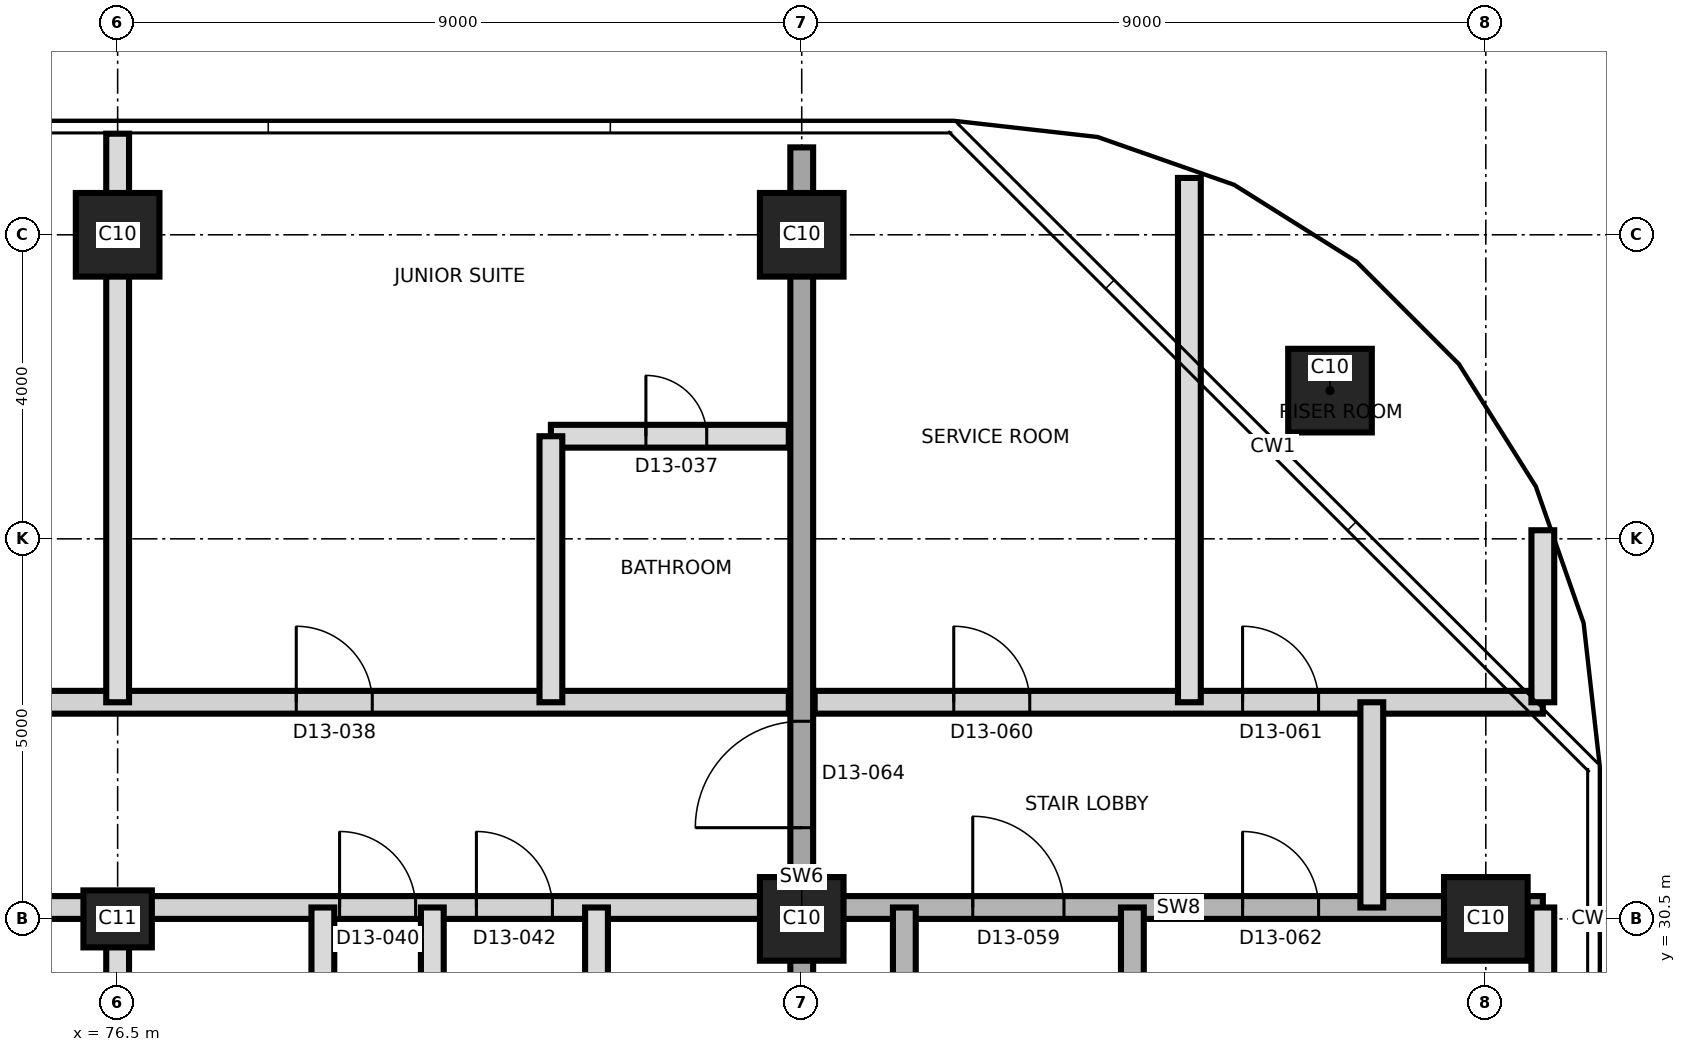
"""IFC4 building model, lengths in metres.
Left out: names, types, materials, properties, quantities, classifications, styles, units other than length and angle.
Written with IfcOpenShell. Run it as: python <this file> out.ifc"""

import sys

from ifc_helpers import new_model, si_unit, direction, frame, frame_2d, origin, origin_2d, place, context, subcontext, project, spatial, rectangle, extrude, element, fill, save


model = new_model("IFC4")
c1 = context("Model", 3, precision=1e-05, world=origin(), true_north=direction((0.0, 1.0)))
c2 = subcontext(c1, "Body", "Model", "MODEL_VIEW")
j1 = project(units=[si_unit("LENGTHUNIT", "METRE"), si_unit("PLANEANGLEUNIT", "RADIAN")], contexts=[c1])
p1 = place(None, origin())
s1 = spatial("IfcSite", under=j1, at=p1, CompositionType="ELEMENT")
p2 = place(p1, origin())
s2 = spatial("IfcBuilding", under=s1, at=p2, CompositionType="ELEMENT")
p3 = place(p2, frame((0.0, 0.0, 142.2)))
s3 = spatial("IfcBuildingStorey", under=s2, at=p3, CompositionType="ELEMENT", Elevation=142.2)
p4 = place(p3, frame((76.5, 30.5, 0.0), z_axis=(0.0, 0.0, 1.0), x_axis=(1.0, 0.0, 0.0)))
e1 = element("IfcColumn", 1, at=p4, inside=s3, PredefinedType="COLUMN", context=c2, shape_type="SweptSolid", body=[
    extrude(rectangle(XDim=0.9, YDim=0.75, at=origin_2d()), origin(), (0.0, 0.0, 1.0), 3.7),
])
for number, where, z_axis, x_axis in (
    (2, (85.5, 30.5, 0.0), (0.0, 0.0, 1.0), (1.0, 0.0, 0.0)),
    (3, (94.5, 30.5, 0.0), (0.0, 0.0, 1.0), (1.0, 0.0, 0.0)),
    (4, (92.45, 37.45, 0.0), (0.0, 0.0, 1.0), (1.0, 0.0, 0.0)),
    (5, (76.5, 39.5, 0.0), (0.0, 0.0, 1.0), (1.0, 0.0, 0.0)),
    (6, (85.5, 39.5, 0.0), (0.0, 0.0, 1.0), (1.0, 0.0, 0.0)),
):
    element("IfcColumn", number, at=place(p3, frame(where, z_axis=z_axis, x_axis=x_axis)), inside=s3, PredefinedType="COLUMN", context=c2, shape_type="SweptSolid", body=[
        extrude(rectangle(XDim=1.1, YDim=1.1, at=origin_2d()), origin(), (0.0, 0.0, 1.0), 3.7),
    ])
p5 = place(p3, frame((85.5, 20.35, 0.0), z_axis=(0.0, 0.0, 1.0), x_axis=(0.0, 1.0, 0.0)))
e7 = element("IfcWall", 7, at=p5, inside=s3, PredefinedType="SHEAR", context=c2, shape_type="SweptSolid", body=[
    extrude(rectangle(XDim=20.3, YDim=0.3, at=frame_2d((10.15, 0.0))), origin(), (0.0, 0.0, 1.0), 3.7),
])
p6 = place(p5, frame((11.35, 0.0, 0.0)))
e8 = element("IfcOpeningElement", 8, at=p6, cuts=e7, PredefinedType="OPENING", context=c2, shape_type="SweptSolid", body=[
    extrude(rectangle(XDim=1.4, YDim=2.1, at=frame_2d((0.7, 1.05))), frame((0.0, 0.16, 0.0), z_axis=(0.0, -1.0, 0.0), x_axis=(1.0, 0.0, 0.0)), (0.0, 0.0, 1.0), 0.32),
])
p7 = place(p3, frame((58.65, 30.65, 0.0), z_axis=(0.0, 0.0, 1.0), x_axis=(1.0, 0.0, 0.0)))
e9 = element("IfcWall", 9, at=p7, inside=s3, PredefinedType="PARTITIONING", context=c2, shape_type="SweptSolid", body=[
    extrude(rectangle(XDim=26.68, YDim=0.3, at=frame_2d((13.34, 0.0))), origin(), (0.0, 0.0, 1.0), 3.4),
])
p8 = place(p7, frame((2.2, 0.0, 0.0)))
e10 = element("IfcOpeningElement", 10, at=p8, cuts=e9, PredefinedType="OPENING", context=c2, shape_type="SweptSolid", body=[
    extrude(rectangle(XDim=1.0, YDim=2.4, at=frame_2d((0.5, 1.2))), frame((0.0, 0.16, 0.0), z_axis=(0.0, -1.0, 0.0), x_axis=(1.0, 0.0, 0.0)), (0.0, 0.0, 1.0), 0.32),
])
p9 = place(p7, frame((12.85, 0.0, 0.0)))
e11 = element("IfcOpeningElement", 11, at=p9, cuts=e9, PredefinedType="OPENING", context=c2, shape_type="SweptSolid", body=[
    extrude(rectangle(XDim=1.0, YDim=2.4, at=frame_2d((0.5, 1.2))), frame((0.0, 0.16, 0.0), z_axis=(0.0, -1.0, 0.0), x_axis=(1.0, 0.0, 0.0)), (0.0, 0.0, 1.0), 0.32),
])
p10 = place(p7, frame((20.77, 0.0, 0.0)))
e12 = element("IfcOpeningElement", 12, at=p10, cuts=e9, PredefinedType="OPENING", context=c2, shape_type="SweptSolid", body=[
    extrude(rectangle(XDim=1.0, YDim=2.1, at=frame_2d((0.5, 1.05))), frame((0.0, 0.16, 0.0), z_axis=(0.0, -1.0, 0.0), x_axis=(1.0, 0.0, 0.0)), (0.0, 0.0, 1.0), 0.32),
])
p11 = place(p7, frame((22.57, 0.0, 0.0)))
e13 = element("IfcOpeningElement", 13, at=p11, cuts=e9, PredefinedType="OPENING", context=c2, shape_type="SweptSolid", body=[
    extrude(rectangle(XDim=1.0, YDim=2.1, at=frame_2d((0.5, 1.05))), frame((0.0, 0.16, 0.0), z_axis=(0.0, -1.0, 0.0), x_axis=(1.0, 0.0, 0.0)), (0.0, 0.0, 1.0), 0.32),
])
p12 = place(p3, frame((85.67, 30.65, 0.0), z_axis=(0.0, 0.0, 1.0), x_axis=(1.0, 0.0, 0.0)))
e14 = element("IfcWall", 14, at=p12, inside=s3, PredefinedType="SHEAR", context=c2, shape_type="SweptSolid", body=[
    extrude(rectangle(XDim=9.58, YDim=0.3, at=frame_2d((4.79, 0.0))), origin(), (0.0, 0.0, 1.0), 3.4),
])
p13 = place(p12, frame((2.08, 0.0, 0.0)))
e15 = element("IfcOpeningElement", 15, at=p13, cuts=e14, PredefinedType="OPENING", context=c2, shape_type="SweptSolid", body=[
    extrude(rectangle(XDim=1.2, YDim=2.1, at=frame_2d((0.6, 1.05))), frame((0.0, 0.16, 0.0), z_axis=(0.0, -1.0, 0.0), x_axis=(1.0, 0.0, 0.0)), (0.0, 0.0, 1.0), 0.32),
])
p14 = place(p12, frame((5.63, 0.0, 0.0)))
e16 = element("IfcOpeningElement", 16, at=p14, cuts=e14, PredefinedType="OPENING", context=c2, shape_type="SweptSolid", body=[
    extrude(rectangle(XDim=1.0, YDim=2.1, at=frame_2d((0.5, 1.05))), frame((0.0, 0.16, 0.0), z_axis=(0.0, -1.0, 0.0), x_axis=(1.0, 0.0, 0.0)), (0.0, 0.0, 1.0), 0.32),
])
p15 = place(p3, frame((58.65, 33.35, 0.0), z_axis=(0.0, 0.0, 1.0), x_axis=(1.0, 0.0, 0.0)))
e17 = element("IfcWall", 17, at=p15, inside=s3, PredefinedType="PARTITIONING", context=c2, shape_type="SweptSolid", body=[
    extrude(rectangle(XDim=26.68, YDim=0.3, at=frame_2d((13.34, 0.0))), origin(), (0.0, 0.0, 1.0), 3.4),
])
p16 = place(p15, frame((0.985, 0.0, 0.0)))
e18 = element("IfcOpeningElement", 18, at=p16, cuts=e17, PredefinedType="OPENING", context=c2, shape_type="SweptSolid", body=[
    extrude(rectangle(XDim=1.2, YDim=2.1, at=frame_2d((0.6, 1.05))), frame((0.0, 0.16, 0.0), z_axis=(0.0, -1.0, 0.0), x_axis=(1.0, 0.0, 0.0)), (0.0, 0.0, 1.0), 0.32),
])
p17 = place(p15, frame((4.235, 0.0, 0.0)))
e19 = element("IfcOpeningElement", 19, at=p17, cuts=e17, PredefinedType="OPENING", context=c2, shape_type="SweptSolid", body=[
    extrude(rectangle(XDim=1.0, YDim=2.1, at=frame_2d((0.5, 1.05))), frame((0.0, 0.16, 0.0), z_axis=(0.0, -1.0, 0.0), x_axis=(1.0, 0.0, 0.0)), (0.0, 0.0, 1.0), 0.32),
])
p18 = place(p15, frame((12.265, 0.0, 0.0)))
e20 = element("IfcOpeningElement", 20, at=p18, cuts=e17, PredefinedType="OPENING", context=c2, shape_type="SweptSolid", body=[
    extrude(rectangle(XDim=1.0, YDim=2.1, at=frame_2d((0.5, 1.05))), frame((0.0, 0.16, 0.0), z_axis=(0.0, -1.0, 0.0), x_axis=(1.0, 0.0, 0.0)), (0.0, 0.0, 1.0), 0.32),
])
p19 = place(p15, frame((15.215, 0.0, 0.0)))
e21 = element("IfcOpeningElement", 21, at=p19, cuts=e17, PredefinedType="OPENING", context=c2, shape_type="SweptSolid", body=[
    extrude(rectangle(XDim=1.4, YDim=2.1, at=frame_2d((0.7, 1.05))), frame((0.0, 0.16, 0.0), z_axis=(0.0, -1.0, 0.0), x_axis=(1.0, 0.0, 0.0)), (0.0, 0.0, 1.0), 0.32),
])
p20 = place(p15, frame((20.2, 0.0, 0.0)))
e22 = element("IfcOpeningElement", 22, at=p20, cuts=e17, PredefinedType="OPENING", context=c2, shape_type="SweptSolid", body=[
    extrude(rectangle(XDim=1.0, YDim=2.4, at=frame_2d((0.5, 1.2))), frame((0.0, 0.16, 0.0), z_axis=(0.0, -1.0, 0.0), x_axis=(1.0, 0.0, 0.0)), (0.0, 0.0, 1.0), 0.32),
])
p21 = place(p3, frame((85.67, 33.35, 0.0), z_axis=(0.0, 0.0, 1.0), x_axis=(1.0, 0.0, 0.0)))
e23 = element("IfcWall", 23, at=p21, inside=s3, PredefinedType="PARTITIONING", context=c2, shape_type="SweptSolid", body=[
    extrude(rectangle(XDim=9.58, YDim=0.3, at=frame_2d((4.79, 0.0))), origin(), (0.0, 0.0, 1.0), 3.4),
])
p22 = place(p21, frame((1.83, 0.0, 0.0)))
e24 = element("IfcOpeningElement", 24, at=p22, cuts=e23, PredefinedType="OPENING", context=c2, shape_type="SweptSolid", body=[
    extrude(rectangle(XDim=1.0, YDim=2.1, at=frame_2d((0.5, 1.05))), frame((0.0, 0.16, 0.0), z_axis=(0.0, -1.0, 0.0), x_axis=(1.0, 0.0, 0.0)), (0.0, 0.0, 1.0), 0.32),
])
p23 = place(p21, frame((5.63, 0.0, 0.0)))
e25 = element("IfcOpeningElement", 25, at=p23, cuts=e23, PredefinedType="OPENING", context=c2, shape_type="SweptSolid", body=[
    extrude(rectangle(XDim=1.0, YDim=2.1, at=frame_2d((0.5, 1.05))), frame((0.0, 0.16, 0.0), z_axis=(0.0, -1.0, 0.0), x_axis=(1.0, 0.0, 0.0)), (0.0, 0.0, 1.0), 0.32),
])
p24 = place(p3, frame((82.2, 36.85, 0.0), z_axis=(0.0, 0.0, 1.0), x_axis=(1.0, 0.0, 0.0)))
e26 = element("IfcWall", 26, at=p24, inside=s3, PredefinedType="PARTITIONING", context=c2, shape_type="SweptSolid", body=[
    extrude(rectangle(XDim=3.13, YDim=0.3, at=frame_2d((1.565, 0.0))), origin(), (0.0, 0.0, 1.0), 3.4),
])
p25 = place(p24, frame((1.25, 0.0, 0.0)))
e27 = element("IfcOpeningElement", 27, at=p25, cuts=e26, PredefinedType="OPENING", context=c2, shape_type="SweptSolid", body=[
    extrude(rectangle(XDim=0.8, YDim=2.1, at=frame_2d((0.4, 1.05))), frame((0.0, 0.16, 0.0), z_axis=(0.0, -1.0, 0.0), x_axis=(1.0, 0.0, 0.0)), (0.0, 0.0, 1.0), 0.32),
])
p26 = place(p3, frame((76.5, 20.35, 0.0), z_axis=(0.0, 0.0, 1.0), x_axis=(0.0, 1.0, 0.0)))
e28 = element("IfcWall", 28, at=p26, inside=s3, PredefinedType="PARTITIONING", context=c2, shape_type="SweptSolid", body=[
    extrude(rectangle(XDim=10.3, YDim=0.3, at=frame_2d((5.15, 0.0))), origin(), (0.0, 0.0, 1.0), 3.4),
])
p27 = place(p3, frame((76.5, 33.35, 0.0), z_axis=(0.0, 0.0, 1.0), x_axis=(0.0, 1.0, 0.0)))
e29 = element("IfcWall", 29, at=p27, inside=s3, PredefinedType="PARTITIONING", context=c2, shape_type="SweptSolid", body=[
    extrude(rectangle(XDim=7.48, YDim=0.3, at=frame_2d((3.74, 0.0))), origin(), (0.0, 0.0, 1.0), 3.4),
])
p28 = place(p3, frame((79.2, 27.45, 0.0), z_axis=(0.0, 0.0, 1.0), x_axis=(0.0, 1.0, 0.0)))
e30 = element("IfcWall", 30, at=p28, inside=s3, PredefinedType="PARTITIONING", context=c2, shape_type="SweptSolid", body=[
    extrude(rectangle(XDim=3.2, YDim=0.3, at=frame_2d((1.6, 0.0))), origin(), (0.0, 0.0, 1.0), 3.4),
])
p29 = place(p3, frame((80.64, 20.35, 0.0), z_axis=(0.0, 0.0, 1.0), x_axis=(0.0, 1.0, 0.0)))
e31 = element("IfcWall", 31, at=p29, inside=s3, PredefinedType="PARTITIONING", context=c2, shape_type="SweptSolid", body=[
    extrude(rectangle(XDim=10.3, YDim=0.3, at=frame_2d((5.15, 0.0))), origin(), (0.0, 0.0, 1.0), 3.4),
])
p30 = place(p3, frame((82.2, 33.35, 0.0), z_axis=(0.0, 0.0, 1.0), x_axis=(0.0, 1.0, 0.0)))
e32 = element("IfcWall", 32, at=p30, inside=s3, PredefinedType="PARTITIONING", context=c2, shape_type="SweptSolid", body=[
    extrude(rectangle(XDim=3.5, YDim=0.3, at=frame_2d((1.75, 0.0))), origin(), (0.0, 0.0, 1.0), 3.4),
])
p31 = place(p3, frame((82.8, 27.45, 0.0), z_axis=(0.0, 0.0, 1.0), x_axis=(0.0, 1.0, 0.0)))
e33 = element("IfcWall", 33, at=p31, inside=s3, PredefinedType="PARTITIONING", context=c2, shape_type="SweptSolid", body=[
    extrude(rectangle(XDim=3.2, YDim=0.3, at=frame_2d((1.6, 0.0))), origin(), (0.0, 0.0, 1.0), 3.4),
])
for number, where, z_axis, x_axis in (
    (34, (86.85, 21.8, 0.0), (0.0, 0.0, 1.0), (0.0, 1.0, 0.0)),
    (35, (89.85, 21.8, 0.0), (0.0, 0.0, 1.0), (0.0, 1.0, 0.0)),
):
    element("IfcWall", number, at=place(p3, frame(where, z_axis=z_axis, x_axis=x_axis)), inside=s3, PredefinedType="SHEAR", context=c2, shape_type="SweptSolid", body=[
        extrude(rectangle(XDim=8.85, YDim=0.3, at=frame_2d((4.425, 0.0))), origin(), (0.0, 0.0, 1.0), 3.4),
    ])
p32 = place(p3, frame((90.6, 33.35, 0.0), z_axis=(0.0, 0.0, 1.0), x_axis=(0.0, 1.0, 0.0)))
e36 = element("IfcWall", 36, at=p32, inside=s3, PredefinedType="PARTITIONING", context=c2, shape_type="SweptSolid", body=[
    extrude(rectangle(XDim=6.898, YDim=0.3, at=frame_2d((3.449, 0.0))), origin(), (0.0, 0.0, 1.0), 3.4),
])
p33 = place(p3, frame((93.0, 30.65, 0.0), z_axis=(0.0, 0.0, 1.0), x_axis=(0.0, 1.0, 0.0)))
e37 = element("IfcWall", 37, at=p33, inside=s3, PredefinedType="PARTITIONING", context=c2, shape_type="SweptSolid", body=[
    extrude(rectangle(XDim=2.7, YDim=0.3, at=frame_2d((1.35, 0.0))), origin(), (0.0, 0.0, 1.0), 3.4),
])
p34 = place(p3, frame((95.25, 25.387, 0.0), z_axis=(0.0, 0.0, 1.0), x_axis=(0.0, 1.0, 0.0)))
e38 = element("IfcWall", 38, at=p34, inside=s3, PredefinedType="PARTITIONING", context=c2, shape_type="SweptSolid", body=[
    extrude(rectangle(XDim=5.263, YDim=0.3, at=frame_2d((2.631, 0.0))), origin(), (0.0, 0.0, 1.0), 3.4),
])
p35 = place(p3, frame((95.25, 33.35, 0.0), z_axis=(0.0, 0.0, 1.0), x_axis=(0.0, 1.0, 0.0)))
e39 = element("IfcWall", 39, at=p35, inside=s3, PredefinedType="PARTITIONING", context=c2, shape_type="SweptSolid", body=[
    extrude(rectangle(XDim=2.263, YDim=0.3, at=frame_2d((1.131, 0.0))), origin(), (0.0, 0.0, 1.0), 3.4),
])
p36 = place(p25, origin())
e40 = element("IfcDoor", 40, at=p36, inside=s3, OperationType="SINGLE_SWING_LEFT", PredefinedType="DOOR", context=c2, shape_type="SweptSolid", body=[
    extrude(rectangle(XDim=0.8, YDim=2.1, at=frame_2d((0.4, 1.05))), frame((0.0, 0.025, 0.0), z_axis=(0.0, -1.0, 0.0), x_axis=(1.0, 0.0, 0.0)), (0.0, 0.0, 1.0), 0.05),
])
fill(e27, e40)
p37 = place(p20, origin())
e41 = element("IfcDoor", 41, at=p37, inside=s3, OperationType="SINGLE_SWING_RIGHT", PredefinedType="DOOR", context=c2, shape_type="SweptSolid", body=[
    extrude(rectangle(XDim=1.0, YDim=2.4, at=frame_2d((0.5, 1.2))), frame((0.0, 0.025, 0.0), z_axis=(0.0, -1.0, 0.0), x_axis=(1.0, 0.0, 0.0)), (0.0, 0.0, 1.0), 0.05),
])
fill(e22, e41)
p38 = place(p10, origin())
e42 = element("IfcDoor", 42, at=p38, inside=s3, OperationType="SINGLE_SWING_LEFT", PredefinedType="DOOR", context=c2, shape_type="SweptSolid", body=[
    extrude(rectangle(XDim=1.0, YDim=2.1, at=frame_2d((0.5, 1.05))), frame((0.0, 0.025, 0.0), z_axis=(0.0, -1.0, 0.0), x_axis=(1.0, 0.0, 0.0)), (0.0, 0.0, 1.0), 0.05),
])
fill(e12, e42)
p39 = place(p11, origin())
e43 = element("IfcDoor", 43, at=p39, inside=s3, OperationType="SINGLE_SWING_LEFT", PredefinedType="DOOR", context=c2, shape_type="SweptSolid", body=[
    extrude(rectangle(XDim=1.0, YDim=2.1, at=frame_2d((0.5, 1.05))), frame((0.0, 0.025, 0.0), z_axis=(0.0, -1.0, 0.0), x_axis=(1.0, 0.0, 0.0)), (0.0, 0.0, 1.0), 0.05),
])
fill(e13, e43)
p40 = place(p13, origin())
e44 = element("IfcDoor", 44, at=p40, inside=s3, OperationType="SINGLE_SWING_LEFT", PredefinedType="DOOR", context=c2, shape_type="SweptSolid", body=[
    extrude(rectangle(XDim=1.2, YDim=2.1, at=frame_2d((0.6, 1.05))), frame((0.0, 0.025, 0.0), z_axis=(0.0, -1.0, 0.0), x_axis=(1.0, 0.0, 0.0)), (0.0, 0.0, 1.0), 0.05),
])
fill(e15, e44)
p41 = place(p22, origin())
e45 = element("IfcDoor", 45, at=p41, inside=s3, OperationType="SINGLE_SWING_LEFT", PredefinedType="DOOR", context=c2, shape_type="SweptSolid", body=[
    extrude(rectangle(XDim=1.0, YDim=2.1, at=frame_2d((0.5, 1.05))), frame((0.0, 0.025, 0.0), z_axis=(0.0, -1.0, 0.0), x_axis=(1.0, 0.0, 0.0)), (0.0, 0.0, 1.0), 0.05),
])
fill(e24, e45)
p42 = place(p23, origin())
e46 = element("IfcDoor", 46, at=p42, inside=s3, OperationType="SINGLE_SWING_RIGHT", PredefinedType="DOOR", context=c2, shape_type="SweptSolid", body=[
    extrude(rectangle(XDim=1.0, YDim=2.1, at=frame_2d((0.5, 1.05))), frame((0.0, 0.025, 0.0), z_axis=(0.0, -1.0, 0.0), x_axis=(1.0, 0.0, 0.0)), (0.0, 0.0, 1.0), 0.05),
])
fill(e25, e46)
p43 = place(p14, origin())
e47 = element("IfcDoor", 47, at=p43, inside=s3, OperationType="SINGLE_SWING_LEFT", PredefinedType="DOOR", context=c2, shape_type="SweptSolid", body=[
    extrude(rectangle(XDim=1.0, YDim=2.1, at=frame_2d((0.5, 1.05))), frame((0.0, 0.025, 0.0), z_axis=(0.0, -1.0, 0.0), x_axis=(1.0, 0.0, 0.0)), (0.0, 0.0, 1.0), 0.05),
])
fill(e16, e47)
p44 = place(p6, origin())
e48 = element("IfcDoor", 48, at=p44, inside=s3, OperationType="SINGLE_SWING_RIGHT", PredefinedType="DOOR", context=c2, shape_type="SweptSolid", body=[
    extrude(rectangle(XDim=1.4, YDim=2.1, at=frame_2d((0.7, 1.05))), frame((0.0, 0.025, 0.0), z_axis=(0.0, -1.0, 0.0), x_axis=(1.0, 0.0, 0.0)), (0.0, 0.0, 1.0), 0.05),
])
fill(e8, e48)
save(model, sys.argv[1])
